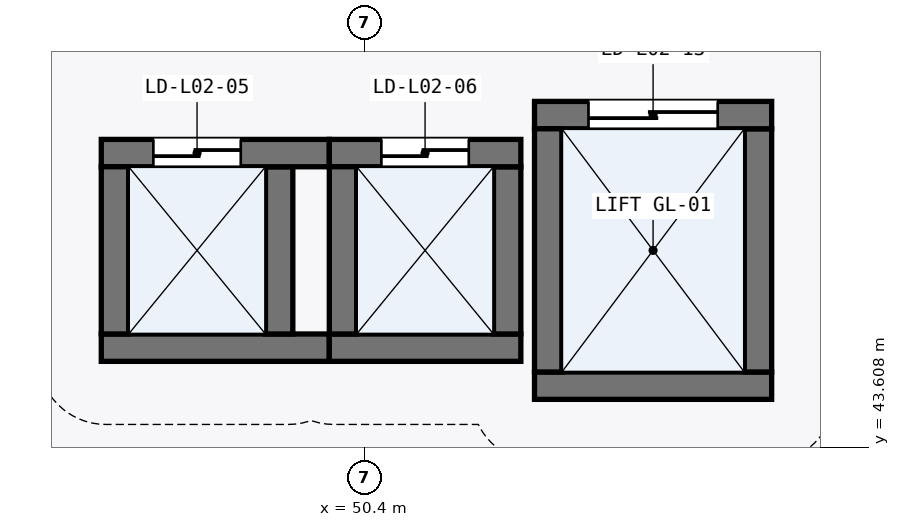
"""IFC4 building model, lengths in metres.
Left out: names, types, materials, properties, quantities, classifications, styles, units other than length and angle.
Written with IfcOpenShell. Run it as: python <this file> out.ifc"""

import sys

from ifc_helpers import new_model, si_unit, direction, frame, frame_2d, origin, place, context, subcontext, project, spatial, rectangle, extrude, element, fill, save


model = new_model("IFC4")
c1 = context("Model", 3, precision=1e-05, world=origin(), true_north=direction((0.0, 1.0)))
c2 = subcontext(c1, "Body", "Model", "MODEL_VIEW")
j1 = project(units=[si_unit("LENGTHUNIT", "METRE"), si_unit("PLANEANGLEUNIT", "RADIAN")], contexts=[c1])
p1 = place(None, origin())
s1 = spatial("IfcSite", under=j1, at=p1, CompositionType="ELEMENT")
p2 = place(p1, origin())
s2 = spatial("IfcBuilding", under=s1, at=p2, CompositionType="ELEMENT")
p3 = place(p2, frame((0.0, 0.0, 6.0)))
s3 = spatial("IfcBuildingStorey", under=s2, at=p3, CompositionType="ELEMENT", Elevation=6.0)
p4 = place(p3, frame((46.94, 44.92, 0.0), z_axis=(0.0, 0.0, 1.0), x_axis=(1.0, 0.0, 0.0)))
e1 = element("IfcWall", 1, at=p4, inside=s3, PredefinedType="SHEAR", context=c2, shape_type="SweptSolid", body=[
    extrude(rectangle(XDim=3.0, YDim=0.36, at=frame_2d((1.5, 0.0))), origin(), (0.0, 0.0, 1.0), 5.145),
])
p5 = place(p3, frame((49.28, 45.1, 0.0), z_axis=(0.0, 0.0, 1.0), x_axis=(0.0, 1.0, 0.0)))
e2 = element("IfcWall", 2, at=p5, inside=s3, PredefinedType="SHEAR", context=c2, shape_type="SweptSolid", body=[
    extrude(rectangle(XDim=2.2, YDim=0.36, at=frame_2d((1.1, 0.0))), origin(), (0.0, 0.0, 1.0), 5.145),
])
p6 = place(p3, frame((49.94, 47.48, 0.0), z_axis=(0.0, 0.0, 1.0), x_axis=(-1.0, 0.0, 0.0)))
e3 = element("IfcWall", 3, at=p6, inside=s3, PredefinedType="SHEAR", context=c2, shape_type="SweptSolid", body=[
    extrude(rectangle(XDim=3.0, YDim=0.36, at=frame_2d((1.5, 0.0))), origin(), (0.0, 0.0, 1.0), 5.145),
])
p7 = place(p6, frame((1.165, 0.0, 0.0)))
e4 = element("IfcOpeningElement", 4, at=p7, cuts=e3, PredefinedType="OPENING", context=c2, shape_type="SweptSolid", body=[
    extrude(rectangle(XDim=1.15, YDim=2.2, at=frame_2d((0.575, 1.1))), frame((0.0, 0.19, 0.0), z_axis=(0.0, -1.0, 0.0), x_axis=(1.0, 0.0, 0.0)), (0.0, 0.0, 1.0), 0.38),
])
p8 = place(p3, frame((47.12, 47.3, 0.0), z_axis=(0.0, 0.0, 1.0), x_axis=(0.0, -1.0, 0.0)))
e5 = element("IfcWall", 5, at=p8, inside=s3, PredefinedType="SHEAR", context=c2, shape_type="SweptSolid", body=[
    extrude(rectangle(XDim=2.2, YDim=0.36, at=frame_2d((1.1, 0.0))), origin(), (0.0, 0.0, 1.0), 5.145),
])
p9 = place(p3, frame((49.94, 44.92, 0.0), z_axis=(0.0, 0.0, 1.0), x_axis=(1.0, 0.0, 0.0)))
e6 = element("IfcWall", 6, at=p9, inside=s3, PredefinedType="SHEAR", context=c2, shape_type="SweptSolid", body=[
    extrude(rectangle(XDim=2.52, YDim=0.36, at=frame_2d((1.26, 0.0))), origin(), (0.0, 0.0, 1.0), 5.145),
])
p10 = place(p3, frame((52.28, 45.1, 0.0), z_axis=(0.0, 0.0, 1.0), x_axis=(0.0, 1.0, 0.0)))
e7 = element("IfcWall", 7, at=p10, inside=s3, PredefinedType="SHEAR", context=c2, shape_type="SweptSolid", body=[
    extrude(rectangle(XDim=2.2, YDim=0.36, at=frame_2d((1.1, 0.0))), origin(), (0.0, 0.0, 1.0), 5.145),
])
p11 = place(p3, frame((52.46, 47.48, 0.0), z_axis=(0.0, 0.0, 1.0), x_axis=(-1.0, 0.0, 0.0)))
e8 = element("IfcWall", 8, at=p11, inside=s3, PredefinedType="SHEAR", context=c2, shape_type="SweptSolid", body=[
    extrude(rectangle(XDim=2.52, YDim=0.36, at=frame_2d((1.26, 0.0))), origin(), (0.0, 0.0, 1.0), 5.145),
])
p12 = place(p11, frame((0.685, 0.0, 0.0)))
e9 = element("IfcOpeningElement", 9, at=p12, cuts=e8, PredefinedType="OPENING", context=c2, shape_type="SweptSolid", body=[
    extrude(rectangle(XDim=1.15, YDim=2.2, at=frame_2d((0.575, 1.1))), frame((0.0, 0.19, 0.0), z_axis=(0.0, -1.0, 0.0), x_axis=(1.0, 0.0, 0.0)), (0.0, 0.0, 1.0), 0.38),
])
p13 = place(p3, frame((50.12, 47.3, 0.0), z_axis=(0.0, 0.0, 1.0), x_axis=(0.0, -1.0, 0.0)))
e10 = element("IfcWall", 10, at=p13, inside=s3, PredefinedType="SHEAR", context=c2, shape_type="SweptSolid", body=[
    extrude(rectangle(XDim=2.2, YDim=0.36, at=frame_2d((1.1, 0.0))), origin(), (0.0, 0.0, 1.0), 5.145),
])
p14 = place(p3, frame((52.64, 44.42, 0.0), z_axis=(0.0, 0.0, 1.0), x_axis=(1.0, 0.0, 0.0)))
e11 = element("IfcWall", 11, at=p14, inside=s3, PredefinedType="SHEAR", context=c2, shape_type="SweptSolid", body=[
    extrude(rectangle(XDim=3.12, YDim=0.36, at=frame_2d((1.56, 0.0))), origin(), (0.0, 0.0, 1.0), 5.145),
])
p15 = place(p3, frame((55.58, 44.6, 0.0), z_axis=(0.0, 0.0, 1.0), x_axis=(0.0, 1.0, 0.0)))
e12 = element("IfcWall", 12, at=p15, inside=s3, PredefinedType="SHEAR", context=c2, shape_type="SweptSolid", body=[
    extrude(rectangle(XDim=3.2, YDim=0.36, at=frame_2d((1.6, 0.0))), origin(), (0.0, 0.0, 1.0), 5.145),
])
p16 = place(p3, frame((55.76, 47.98, 0.0), z_axis=(0.0, 0.0, 1.0), x_axis=(-1.0, 0.0, 0.0)))
e13 = element("IfcWall", 13, at=p16, inside=s3, PredefinedType="SHEAR", context=c2, shape_type="SweptSolid", body=[
    extrude(rectangle(XDim=3.12, YDim=0.36, at=frame_2d((1.56, 0.0))), origin(), (0.0, 0.0, 1.0), 5.145),
])
p17 = place(p16, frame((0.71, 0.0, 0.0)))
e14 = element("IfcOpeningElement", 14, at=p17, cuts=e13, PredefinedType="OPENING", context=c2, shape_type="SweptSolid", body=[
    extrude(rectangle(XDim=1.7, YDim=2.3, at=frame_2d((0.85, 1.15))), frame((0.0, 0.19, 0.0), z_axis=(0.0, -1.0, 0.0), x_axis=(1.0, 0.0, 0.0)), (0.0, 0.0, 1.0), 0.38),
])
p18 = place(p3, frame((52.82, 47.8, 0.0), z_axis=(0.0, 0.0, 1.0), x_axis=(0.0, -1.0, 0.0)))
e15 = element("IfcWall", 15, at=p18, inside=s3, PredefinedType="SHEAR", context=c2, shape_type="SweptSolid", body=[
    extrude(rectangle(XDim=3.2, YDim=0.36, at=frame_2d((1.6, 0.0))), origin(), (0.0, 0.0, 1.0), 5.145),
])
p19 = place(p7, frame((1.15, 0.0, 0.0), z_axis=(0.0, 0.0, 1.0), x_axis=(-1.0, 0.0, 0.0)))
e16 = element("IfcDoor", 16, at=p19, inside=s3, OperationType="DOUBLE_DOOR_SLIDING", PredefinedType="DOOR", context=c2, shape_type="SweptSolid", body=[
    extrude(rectangle(XDim=1.15, YDim=2.2, at=frame_2d((0.575, 1.1))), frame((0.0, 0.025, 0.0), z_axis=(0.0, -1.0, 0.0), x_axis=(1.0, 0.0, 0.0)), (0.0, 0.0, 1.0), 0.05),
])
fill(e4, e16)
p20 = place(p12, frame((1.15, 0.0, 0.0), z_axis=(0.0, 0.0, 1.0), x_axis=(-1.0, 0.0, 0.0)))
e17 = element("IfcDoor", 17, at=p20, inside=s3, OperationType="DOUBLE_DOOR_SLIDING", PredefinedType="DOOR", context=c2, shape_type="SweptSolid", body=[
    extrude(rectangle(XDim=1.15, YDim=2.2, at=frame_2d((0.575, 1.1))), frame((0.0, 0.025, 0.0), z_axis=(0.0, -1.0, 0.0), x_axis=(1.0, 0.0, 0.0)), (0.0, 0.0, 1.0), 0.05),
])
fill(e9, e17)
p21 = place(p17, frame((1.7, 0.0, 0.0), z_axis=(0.0, 0.0, 1.0), x_axis=(-1.0, 0.0, 0.0)))
e18 = element("IfcDoor", 18, at=p21, inside=s3, OperationType="DOUBLE_DOOR_SLIDING", PredefinedType="DOOR", context=c2, shape_type="SweptSolid", body=[
    extrude(rectangle(XDim=1.7, YDim=2.3, at=frame_2d((0.85, 1.15))), frame((0.0, 0.025, 0.0), z_axis=(0.0, -1.0, 0.0), x_axis=(1.0, 0.0, 0.0)), (0.0, 0.0, 1.0), 0.05),
])
fill(e14, e18)
save(model, sys.argv[1])
